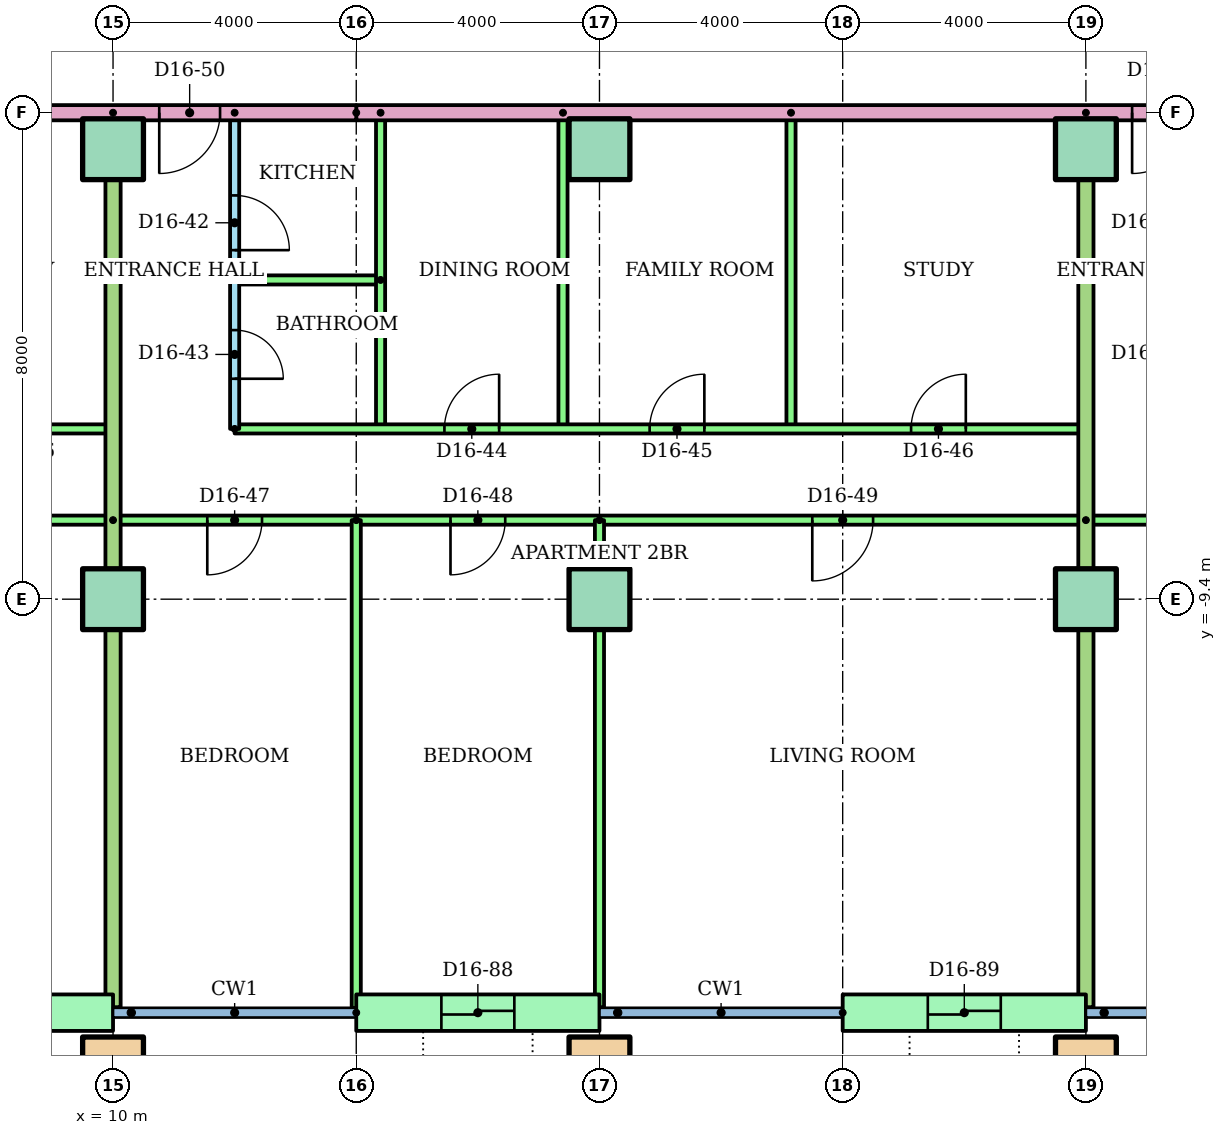
"""IFC4 building model, lengths in metres.
Left out: names, types, materials, properties, quantities, classifications, styles, units other than length and angle.
Written with IfcOpenShell. Run it as: python <this file> out.ifc"""

import sys

from ifc_helpers import new_model, si_unit, direction, frame, frame_2d, origin, origin_2d, place, context, subcontext, project, spatial, rectangle, hollow_rectangle, extrude, element, fill, save


model = new_model("IFC4")
c1 = context("Model", 3, precision=1e-05, world=origin(), true_north=direction((0.0, 1.0)))
c2 = subcontext(c1, "Body", "Model", "MODEL_VIEW")
j1 = project(units=[si_unit("LENGTHUNIT", "METRE"), si_unit("PLANEANGLEUNIT", "RADIAN")], contexts=[c1])
p1 = place(None, origin())
s1 = spatial("IfcSite", under=j1, at=p1, CompositionType="ELEMENT")
p2 = place(p1, origin())
s2 = spatial("IfcBuilding", under=s1, at=p2, CompositionType="ELEMENT")
p3 = place(p2, frame((0.0, 0.0, 60.8)))
s3 = spatial("IfcBuildingStorey", under=s2, at=p3, CompositionType="ELEMENT", Elevation=60.8)
for number, where in (
    (1, (10.0, -17.1, 0.0)),
    (2, (18.0, -17.1, 0.0)),
    (3, (26.0, -17.1, 0.0)),
):
    element("IfcColumn", number, at=place(p3, frame(where)), inside=s3, PredefinedType="COLUMN", context=c2, shape_type="SweptSolid", body=[
        extrude(hollow_rectangle(XDim=1.0, YDim=1.0, WallThickness=0.05, at=origin_2d()), origin(), (0.0, 0.0, 1.0), 3.2),
    ])
for number, where in (
    (4, (10.0, -9.4, 0.0)),
    (5, (18.0, -9.4, 0.0)),
    (6, (26.0, -9.4, 0.0)),
    (7, (10.0, -2.0, 0.0)),
    (8, (18.0, -2.0, 0.0)),
    (9, (26.0, -2.0, 0.0)),
):
    element("IfcColumn", number, at=place(p3, frame(where)), inside=s3, PredefinedType="COLUMN", context=c2, shape_type="SweptSolid", body=[
        extrude(rectangle(XDim=1.0, YDim=1.0, at=origin_2d()), origin(), (0.0, 0.0, 1.0), 3.2),
    ])
p4 = place(p3, frame((6.0, -16.2, 0.0)))
e10 = element("IfcWall", 10, at=p4, inside=s3, PredefinedType="STANDARD", context=c2, shape_type="SweptSolid", body=[
    extrude(rectangle(XDim=4.0, YDim=0.6, at=frame_2d((2.0, 0.0))), origin(), (0.0, 0.0, 1.0), 2.8),
])
p5 = place(p4, frame((1.4, 0.0, 0.0)))
e11 = element("IfcOpeningElement", 11, at=p5, cuts=e10, PredefinedType="OPENING", context=c2, shape_type="SweptSolid", body=[
    extrude(rectangle(XDim=1.2, YDim=2.1, at=frame_2d((0.6, 1.05))), frame((0.0, 0.31, 0.0), z_axis=(0.0, -1.0, 0.0), x_axis=(1.0, 0.0, 0.0)), (0.0, 0.0, 1.0), 0.62),
])
p6 = place(p3, frame((14.0, -16.2, 0.0)))
e12 = element("IfcWall", 12, at=p6, inside=s3, PredefinedType="STANDARD", context=c2, shape_type="SweptSolid", body=[
    extrude(rectangle(XDim=4.0, YDim=0.6, at=frame_2d((2.0, 0.0))), origin(), (0.0, 0.0, 1.0), 2.8),
])
p7 = place(p6, frame((1.4, 0.0, 0.0)))
e13 = element("IfcOpeningElement", 13, at=p7, cuts=e12, PredefinedType="OPENING", context=c2, shape_type="SweptSolid", body=[
    extrude(rectangle(XDim=1.2, YDim=2.1, at=frame_2d((0.6, 1.05))), frame((0.0, 0.31, 0.0), z_axis=(0.0, -1.0, 0.0), x_axis=(1.0, 0.0, 0.0)), (0.0, 0.0, 1.0), 0.62),
])
p8 = place(p3, frame((22.0, -16.2, 0.0)))
e14 = element("IfcWall", 14, at=p8, inside=s3, PredefinedType="STANDARD", context=c2, shape_type="SweptSolid", body=[
    extrude(rectangle(XDim=4.0, YDim=0.6, at=frame_2d((2.0, 0.0))), origin(), (0.0, 0.0, 1.0), 2.8),
])
p9 = place(p8, frame((1.4, 0.0, 0.0)))
e15 = element("IfcOpeningElement", 15, at=p9, cuts=e14, PredefinedType="OPENING", context=c2, shape_type="SweptSolid", body=[
    extrude(rectangle(XDim=1.2, YDim=2.1, at=frame_2d((0.6, 1.05))), frame((0.0, 0.31, 0.0), z_axis=(0.0, -1.0, 0.0), x_axis=(1.0, 0.0, 0.0)), (0.0, 0.0, 1.0), 0.62),
])
p10 = place(p3, frame((-4.0, -6.6, 0.0)))
e16 = element("IfcWall", 16, at=p10, inside=s3, PredefinedType="PARTITIONING", context=c2, shape_type="SweptSolid", body=[
    extrude(rectangle(XDim=14.0, YDim=0.15, at=frame_2d((7.0, 0.0))), origin(), (0.0, 0.0, 1.0), 2.4),
])
p11 = place(p10, frame((4.325, 0.0, 0.0)))
e17 = element("IfcOpeningElement", 17, at=p11, cuts=e16, PredefinedType="OPENING", context=c2, shape_type="SweptSolid", body=[
    extrude(rectangle(XDim=0.9, YDim=2.1, at=frame_2d((0.45, 1.05))), frame((0.0, 0.085, 0.0), z_axis=(0.0, -1.0, 0.0), x_axis=(1.0, 0.0, 0.0)), (0.0, 0.0, 1.0), 0.17),
])
p12 = place(p10, frame((8.575, 0.0, 0.0)))
e18 = element("IfcOpeningElement", 18, at=p12, cuts=e16, PredefinedType="OPENING", context=c2, shape_type="SweptSolid", body=[
    extrude(rectangle(XDim=0.9, YDim=2.1, at=frame_2d((0.45, 1.05))), frame((0.0, 0.085, 0.0), z_axis=(0.0, -1.0, 0.0), x_axis=(1.0, 0.0, 0.0)), (0.0, 0.0, 1.0), 0.17),
])
p13 = place(p10, frame((12.0, 0.0, 0.0)))
e19 = element("IfcOpeningElement", 19, at=p13, cuts=e16, PredefinedType="OPENING", context=c2, shape_type="SweptSolid", body=[
    extrude(rectangle(XDim=0.9, YDim=2.1, at=frame_2d((0.45, 1.05))), frame((0.0, 0.085, 0.0), z_axis=(0.0, -1.0, 0.0), x_axis=(1.0, 0.0, 0.0)), (0.0, 0.0, 1.0), 0.17),
])
p14 = place(p3, frame((10.0, -8.1, 0.0), z_axis=(0.0, 0.0, 1.0), x_axis=(-1.0, 0.0, 0.0)))
e20 = element("IfcWall", 20, at=p14, inside=s3, PredefinedType="PARTITIONING", context=c2, shape_type="SweptSolid", body=[
    extrude(rectangle(XDim=16.0, YDim=0.15, at=frame_2d((8.0, 0.0))), origin(), (0.0, 0.0, 1.0), 2.4),
])
p15 = place(p14, frame((13.55, 0.0, 0.0)))
e21 = element("IfcOpeningElement", 21, at=p15, cuts=e20, PredefinedType="OPENING", context=c2, shape_type="SweptSolid", body=[
    extrude(rectangle(XDim=0.9, YDim=2.1, at=frame_2d((0.45, 1.05))), frame((0.0, 0.085, 0.0), z_axis=(0.0, -1.0, 0.0), x_axis=(1.0, 0.0, 0.0)), (0.0, 0.0, 1.0), 0.17),
])
p16 = place(p14, frame((9.5, 0.0, 0.0)))
e22 = element("IfcOpeningElement", 22, at=p16, cuts=e20, PredefinedType="OPENING", context=c2, shape_type="SweptSolid", body=[
    extrude(rectangle(XDim=1.0, YDim=2.1, at=frame_2d((0.5, 1.05))), frame((0.0, 0.085, 0.0), z_axis=(0.0, -1.0, 0.0), x_axis=(1.0, 0.0, 0.0)), (0.0, 0.0, 1.0), 0.17),
])
p17 = place(p14, frame((5.55, 0.0, 0.0)))
e23 = element("IfcOpeningElement", 23, at=p17, cuts=e20, PredefinedType="OPENING", context=c2, shape_type="SweptSolid", body=[
    extrude(rectangle(XDim=0.9, YDim=2.1, at=frame_2d((0.45, 1.05))), frame((0.0, 0.085, 0.0), z_axis=(0.0, -1.0, 0.0), x_axis=(1.0, 0.0, 0.0)), (0.0, 0.0, 1.0), 0.17),
])
p18 = place(p14, frame((1.55, 0.0, 0.0)))
e24 = element("IfcOpeningElement", 24, at=p18, cuts=e20, PredefinedType="OPENING", context=c2, shape_type="SweptSolid", body=[
    extrude(rectangle(XDim=0.9, YDim=2.1, at=frame_2d((0.45, 1.05))), frame((0.0, 0.085, 0.0), z_axis=(0.0, -1.0, 0.0), x_axis=(1.0, 0.0, 0.0)), (0.0, 0.0, 1.0), 0.17),
])
p19 = place(p3, frame((12.0, -1.4, 0.0), z_axis=(0.0, 0.0, 1.0), x_axis=(0.0, -1.0, 0.0)))
e25 = element("IfcWall", 25, at=p19, inside=s3, PredefinedType="PARTITIONING", context=c2, shape_type="SweptSolid", body=[
    extrude(rectangle(XDim=5.2, YDim=0.15, at=frame_2d((2.6, 0.0))), origin(), (0.0, 0.0, 1.0), 2.4),
])
p20 = place(p19, frame((1.36, 0.0, 0.0)))
e26 = element("IfcOpeningElement", 26, at=p20, cuts=e25, PredefinedType="OPENING", context=c2, shape_type="SweptSolid", body=[
    extrude(rectangle(XDim=0.9, YDim=2.1, at=frame_2d((0.45, 1.05))), frame((0.0, 0.085, 0.0), z_axis=(0.0, -1.0, 0.0), x_axis=(1.0, 0.0, 0.0)), (0.0, 0.0, 1.0), 0.17),
])
p21 = place(p19, frame((3.575, 0.0, 0.0)))
e27 = element("IfcOpeningElement", 27, at=p21, cuts=e25, PredefinedType="OPENING", context=c2, shape_type="SweptSolid", body=[
    extrude(rectangle(XDim=0.8, YDim=2.1, at=frame_2d((0.4, 1.05))), frame((0.0, 0.085, 0.0), z_axis=(0.0, -1.0, 0.0), x_axis=(1.0, 0.0, 0.0)), (0.0, 0.0, 1.0), 0.17),
])
p22 = place(p3, frame((14.4, -4.15, 0.0), z_axis=(0.0, 0.0, 1.0), x_axis=(-1.0, 0.0, 0.0)))
e28 = element("IfcWall", 28, at=p22, inside=s3, PredefinedType="PARTITIONING", context=c2, shape_type="SweptSolid", body=[
    extrude(rectangle(XDim=2.4, YDim=0.15, at=frame_2d((1.2, 0.0))), origin(), (0.0, 0.0, 1.0), 2.4),
])
for number, where, z_axis, x_axis in (
    (29, (14.4, -1.4, 0.0), (0.0, 0.0, 1.0), (0.0, -1.0, 0.0)),
    (30, (17.4, -1.4, 0.0), (0.0, 0.0, 1.0), (0.0, -1.0, 0.0)),
    (31, (21.15, -1.4, 0.0), (0.0, 0.0, 1.0), (0.0, -1.0, 0.0)),
):
    element("IfcWall", number, at=place(p3, frame(where, z_axis=z_axis, x_axis=x_axis)), inside=s3, PredefinedType="PARTITIONING", context=c2, shape_type="SweptSolid", body=[
        extrude(rectangle(XDim=5.2, YDim=0.15, at=frame_2d((2.6, 0.0))), origin(), (0.0, 0.0, 1.0), 2.4),
    ])
p23 = place(p3, frame((12.0, -6.6, 0.0)))
e32 = element("IfcWall", 32, at=p23, inside=s3, PredefinedType="PARTITIONING", context=c2, shape_type="SweptSolid", body=[
    extrude(rectangle(XDim=14.0, YDim=0.15, at=frame_2d((7.0, 0.0))), origin(), (0.0, 0.0, 1.0), 2.4),
])
p24 = place(p23, frame((3.45, 0.0, 0.0)))
e33 = element("IfcOpeningElement", 33, at=p24, cuts=e32, PredefinedType="OPENING", context=c2, shape_type="SweptSolid", body=[
    extrude(rectangle(XDim=0.9, YDim=2.1, at=frame_2d((0.45, 1.05))), frame((0.0, 0.085, 0.0), z_axis=(0.0, -1.0, 0.0), x_axis=(1.0, 0.0, 0.0)), (0.0, 0.0, 1.0), 0.17),
])
p25 = place(p23, frame((6.825, 0.0, 0.0)))
e34 = element("IfcOpeningElement", 34, at=p25, cuts=e32, PredefinedType="OPENING", context=c2, shape_type="SweptSolid", body=[
    extrude(rectangle(XDim=0.9, YDim=2.1, at=frame_2d((0.45, 1.05))), frame((0.0, 0.085, 0.0), z_axis=(0.0, -1.0, 0.0), x_axis=(1.0, 0.0, 0.0)), (0.0, 0.0, 1.0), 0.17),
])
p26 = place(p23, frame((11.125, 0.0, 0.0)))
e35 = element("IfcOpeningElement", 35, at=p26, cuts=e32, PredefinedType="OPENING", context=c2, shape_type="SweptSolid", body=[
    extrude(rectangle(XDim=0.9, YDim=2.1, at=frame_2d((0.45, 1.05))), frame((0.0, 0.085, 0.0), z_axis=(0.0, -1.0, 0.0), x_axis=(1.0, 0.0, 0.0)), (0.0, 0.0, 1.0), 0.17),
])
p27 = place(p3, frame((26.0, -8.1, 0.0), z_axis=(0.0, 0.0, 1.0), x_axis=(-1.0, 0.0, 0.0)))
e36 = element("IfcWall", 36, at=p27, inside=s3, PredefinedType="PARTITIONING", context=c2, shape_type="SweptSolid", body=[
    extrude(rectangle(XDim=16.0, YDim=0.15, at=frame_2d((8.0, 0.0))), origin(), (0.0, 0.0, 1.0), 2.4),
])
p28 = place(p27, frame((13.55, 0.0, 0.0)))
e37 = element("IfcOpeningElement", 37, at=p28, cuts=e36, PredefinedType="OPENING", context=c2, shape_type="SweptSolid", body=[
    extrude(rectangle(XDim=0.9, YDim=2.1, at=frame_2d((0.45, 1.05))), frame((0.0, 0.085, 0.0), z_axis=(0.0, -1.0, 0.0), x_axis=(1.0, 0.0, 0.0)), (0.0, 0.0, 1.0), 0.17),
])
p29 = place(p27, frame((9.55, 0.0, 0.0)))
e38 = element("IfcOpeningElement", 38, at=p29, cuts=e36, PredefinedType="OPENING", context=c2, shape_type="SweptSolid", body=[
    extrude(rectangle(XDim=0.9, YDim=2.1, at=frame_2d((0.45, 1.05))), frame((0.0, 0.085, 0.0), z_axis=(0.0, -1.0, 0.0), x_axis=(1.0, 0.0, 0.0)), (0.0, 0.0, 1.0), 0.17),
])
p30 = place(p27, frame((3.5, 0.0, 0.0)))
e39 = element("IfcOpeningElement", 39, at=p30, cuts=e36, PredefinedType="OPENING", context=c2, shape_type="SweptSolid", body=[
    extrude(rectangle(XDim=1.0, YDim=2.1, at=frame_2d((0.5, 1.05))), frame((0.0, 0.085, 0.0), z_axis=(0.0, -1.0, 0.0), x_axis=(1.0, 0.0, 0.0)), (0.0, 0.0, 1.0), 0.17),
])
p31 = place(p3, frame((14.0, -8.1, 0.0), z_axis=(0.0, 0.0, 1.0), x_axis=(0.0, -1.0, 0.0)))
e40 = element("IfcWall", 40, at=p31, inside=s3, PredefinedType="PARTITIONING", context=c2, shape_type="SweptSolid", body=[
    extrude(rectangle(XDim=8.021, YDim=0.15, at=frame_2d((4.01, 0.0))), origin(), (0.0, 0.0, 1.0), 2.4),
])
p32 = place(p3, frame((18.0, -8.1, 0.0), z_axis=(0.0, 0.0, 1.0), x_axis=(0.0, -1.0, 0.0)))
e41 = element("IfcWall", 41, at=p32, inside=s3, PredefinedType="PARTITIONING", context=c2, shape_type="SweptSolid", body=[
    extrude(rectangle(XDim=8.01, YDim=0.15, at=frame_2d((4.005, 0.0))), origin(), (0.0, 0.0, 1.0), 2.4),
])
p33 = place(p3, frame((10.0, -1.4, 0.0), z_axis=(0.0, 0.0, 1.0), x_axis=(0.0, -1.0, 0.0)))
e42 = element("IfcWall", 42, at=p33, inside=s3, PredefinedType="PARTITIONING", context=c2, shape_type="SweptSolid", body=[
    extrude(rectangle(XDim=14.71, YDim=0.25, at=frame_2d((7.355, 0.0))), origin(), (0.0, 0.0, 1.0), 2.4),
])
p34 = place(p3, frame((36.52, -8.1, 0.0), z_axis=(0.0, 0.0, 1.0), x_axis=(-1.0, 0.0, 0.0)))
e43 = element("IfcWall", 43, at=p34, inside=s3, PredefinedType="PARTITIONING", context=c2, shape_type="SweptSolid", body=[
    extrude(rectangle(XDim=10.52, YDim=0.15, at=frame_2d((5.26, 0.0))), origin(), (0.0, 0.0, 1.0), 2.4),
])
p35 = place(p34, frame((7.12, 0.0, 0.0)))
e44 = element("IfcOpeningElement", 44, at=p35, cuts=e43, PredefinedType="OPENING", context=c2, shape_type="SweptSolid", body=[
    extrude(rectangle(XDim=1.0, YDim=2.1, at=frame_2d((0.5, 1.05))), frame((0.0, 0.085, 0.0), z_axis=(0.0, -1.0, 0.0), x_axis=(1.0, 0.0, 0.0)), (0.0, 0.0, 1.0), 0.17),
])
p36 = place(p34, frame((0.76, 0.0, 0.0)))
e45 = element("IfcOpeningElement", 45, at=p36, cuts=e43, PredefinedType="OPENING", context=c2, shape_type="SweptSolid", body=[
    extrude(rectangle(XDim=1.0, YDim=2.1, at=frame_2d((0.5, 1.05))), frame((0.0, 0.085, 0.0), z_axis=(0.0, -1.0, 0.0), x_axis=(1.0, 0.0, 0.0)), (0.0, 0.0, 1.0), 0.17),
])
p37 = place(p3, frame((26.0, -1.4, 0.0), z_axis=(0.0, 0.0, 1.0), x_axis=(0.0, -1.0, 0.0)))
e46 = element("IfcWall", 46, at=p37, inside=s3, PredefinedType="PARTITIONING", context=c2, shape_type="SweptSolid", body=[
    extrude(rectangle(XDim=14.71, YDim=0.25, at=frame_2d((7.355, 0.0))), origin(), (0.0, 0.0, 1.0), 2.4),
])
p38 = place(p3, frame((29.0, -1.4, 0.0), z_axis=(0.0, 0.0, 1.0), x_axis=(-1.0, 0.0, 0.0)))
e47 = element("IfcWall", 47, at=p38, inside=s3, PredefinedType="PARTITIONING", context=c2, shape_type="SweptSolid", body=[
    extrude(rectangle(XDim=15.0, YDim=0.25, at=frame_2d((7.5, 0.0))), origin(), (0.0, 0.0, 1.0), 2.4),
])
p39 = place(p38, frame((1.24, 0.0, 0.0)))
e48 = element("IfcOpeningElement", 48, at=p39, cuts=e47, PredefinedType="OPENING", context=c2, shape_type="SweptSolid", body=[
    extrude(rectangle(XDim=1.0, YDim=2.1, at=frame_2d((0.5, 1.05))), frame((0.0, 0.135, 0.0), z_axis=(0.0, -1.0, 0.0), x_axis=(1.0, 0.0, 0.0)), (0.0, 0.0, 1.0), 0.27),
])
p40 = place(p3, frame((14.0, -1.4, 0.0), z_axis=(0.0, 0.0, 1.0), x_axis=(-1.0, 0.0, 0.0)))
e49 = element("IfcWall", 49, at=p40, inside=s3, PredefinedType="PARTITIONING", context=c2, shape_type="SweptSolid", body=[
    extrude(rectangle(XDim=28.0, YDim=0.25, at=frame_2d((14.0, 0.0))), origin(), (0.0, 0.0, 1.0), 2.4),
])
p41 = place(p40, frame((20.76, 0.0, 0.0)))
e50 = element("IfcOpeningElement", 50, at=p41, cuts=e49, PredefinedType="OPENING", context=c2, shape_type="SweptSolid", body=[
    extrude(rectangle(XDim=1.0, YDim=2.1, at=frame_2d((0.5, 1.05))), frame((0.0, 0.135, 0.0), z_axis=(0.0, -1.0, 0.0), x_axis=(1.0, 0.0, 0.0)), (0.0, 0.0, 1.0), 0.27),
])
p42 = place(p40, frame((18.24, 0.0, 0.0)))
e51 = element("IfcOpeningElement", 51, at=p42, cuts=e49, PredefinedType="OPENING", context=c2, shape_type="SweptSolid", body=[
    extrude(rectangle(XDim=1.0, YDim=2.1, at=frame_2d((0.5, 1.05))), frame((0.0, 0.135, 0.0), z_axis=(0.0, -1.0, 0.0), x_axis=(1.0, 0.0, 0.0)), (0.0, 0.0, 1.0), 0.27),
])
p43 = place(p40, frame((2.24, 0.0, 0.0)))
e52 = element("IfcOpeningElement", 52, at=p43, cuts=e49, PredefinedType="OPENING", context=c2, shape_type="SweptSolid", body=[
    extrude(rectangle(XDim=1.0, YDim=2.1, at=frame_2d((0.5, 1.05))), frame((0.0, 0.135, 0.0), z_axis=(0.0, -1.0, 0.0), x_axis=(1.0, 0.0, 0.0)), (0.0, 0.0, 1.0), 0.27),
])
p44 = place(p20, origin())
e53 = element("IfcDoor", 53, at=p44, inside=s3, OperationType="SINGLE_SWING_RIGHT", PredefinedType="DOOR", context=c2, shape_type="SweptSolid", body=[
    extrude(rectangle(XDim=0.9, YDim=2.1, at=frame_2d((0.45, 1.05))), frame((0.0, 0.025, 0.0), z_axis=(0.0, -1.0, 0.0), x_axis=(1.0, 0.0, 0.0)), (0.0, 0.0, 1.0), 0.05),
])
fill(e26, e53)
p45 = place(p21, origin())
e54 = element("IfcDoor", 54, at=p45, inside=s3, OperationType="SINGLE_SWING_RIGHT", PredefinedType="DOOR", context=c2, shape_type="SweptSolid", body=[
    extrude(rectangle(XDim=0.8, YDim=2.1, at=frame_2d((0.4, 1.05))), frame((0.0, 0.025, 0.0), z_axis=(0.0, -1.0, 0.0), x_axis=(1.0, 0.0, 0.0)), (0.0, 0.0, 1.0), 0.05),
])
fill(e27, e54)
p46 = place(p24, origin())
e55 = element("IfcDoor", 55, at=p46, inside=s3, OperationType="SINGLE_SWING_RIGHT", PredefinedType="DOOR", context=c2, shape_type="SweptSolid", body=[
    extrude(rectangle(XDim=0.9, YDim=2.1, at=frame_2d((0.45, 1.05))), frame((0.0, 0.025, 0.0), z_axis=(0.0, -1.0, 0.0), x_axis=(1.0, 0.0, 0.0)), (0.0, 0.0, 1.0), 0.05),
])
fill(e33, e55)
p47 = place(p25, origin())
e56 = element("IfcDoor", 56, at=p47, inside=s3, OperationType="SINGLE_SWING_RIGHT", PredefinedType="DOOR", context=c2, shape_type="SweptSolid", body=[
    extrude(rectangle(XDim=0.9, YDim=2.1, at=frame_2d((0.45, 1.05))), frame((0.0, 0.025, 0.0), z_axis=(0.0, -1.0, 0.0), x_axis=(1.0, 0.0, 0.0)), (0.0, 0.0, 1.0), 0.05),
])
fill(e34, e56)
p48 = place(p26, origin())
e57 = element("IfcDoor", 57, at=p48, inside=s3, OperationType="SINGLE_SWING_RIGHT", PredefinedType="DOOR", context=c2, shape_type="SweptSolid", body=[
    extrude(rectangle(XDim=0.9, YDim=2.1, at=frame_2d((0.45, 1.05))), frame((0.0, 0.025, 0.0), z_axis=(0.0, -1.0, 0.0), x_axis=(1.0, 0.0, 0.0)), (0.0, 0.0, 1.0), 0.05),
])
fill(e35, e57)
p49 = place(p28, origin())
e58 = element("IfcDoor", 58, at=p49, inside=s3, OperationType="SINGLE_SWING_RIGHT", PredefinedType="DOOR", context=c2, shape_type="SweptSolid", body=[
    extrude(rectangle(XDim=0.9, YDim=2.1, at=frame_2d((0.45, 1.05))), frame((0.0, 0.025, 0.0), z_axis=(0.0, -1.0, 0.0), x_axis=(1.0, 0.0, 0.0)), (0.0, 0.0, 1.0), 0.05),
])
fill(e37, e58)
p50 = place(p29, origin())
e59 = element("IfcDoor", 59, at=p50, inside=s3, OperationType="SINGLE_SWING_RIGHT", PredefinedType="DOOR", context=c2, shape_type="SweptSolid", body=[
    extrude(rectangle(XDim=0.9, YDim=2.1, at=frame_2d((0.45, 1.05))), frame((0.0, 0.025, 0.0), z_axis=(0.0, -1.0, 0.0), x_axis=(1.0, 0.0, 0.0)), (0.0, 0.0, 1.0), 0.05),
])
fill(e38, e59)
p51 = place(p30, origin())
e60 = element("IfcDoor", 60, at=p51, inside=s3, OperationType="SINGLE_SWING_RIGHT", PredefinedType="DOOR", context=c2, shape_type="SweptSolid", body=[
    extrude(rectangle(XDim=1.0, YDim=2.1, at=frame_2d((0.5, 1.05))), frame((0.0, 0.025, 0.0), z_axis=(0.0, -1.0, 0.0), x_axis=(1.0, 0.0, 0.0)), (0.0, 0.0, 1.0), 0.05),
])
fill(e39, e60)
p52 = place(p43, origin())
e61 = element("IfcDoor", 61, at=p52, inside=s3, OperationType="SINGLE_SWING_RIGHT", PredefinedType="DOOR", context=c2, shape_type="SweptSolid", body=[
    extrude(rectangle(XDim=1.0, YDim=2.1, at=frame_2d((0.5, 1.05))), frame((0.0, 0.025, 0.0), z_axis=(0.0, -1.0, 0.0), x_axis=(1.0, 0.0, 0.0)), (0.0, 0.0, 1.0), 0.05),
])
fill(e52, e61)
p53 = place(p39, origin())
e62 = element("IfcDoor", 62, at=p53, inside=s3, OperationType="SINGLE_SWING_RIGHT", PredefinedType="DOOR", context=c2, shape_type="SweptSolid", body=[
    extrude(rectangle(XDim=1.0, YDim=2.1, at=frame_2d((0.5, 1.05))), frame((0.0, 0.025, 0.0), z_axis=(0.0, -1.0, 0.0), x_axis=(1.0, 0.0, 0.0)), (0.0, 0.0, 1.0), 0.05),
])
fill(e48, e62)
p54 = place(p7, origin())
e63 = element("IfcDoor", 63, at=p54, inside=s3, OperationType="SLIDING_TO_LEFT", PredefinedType="DOOR", context=c2, shape_type="SweptSolid", body=[
    extrude(rectangle(XDim=1.2, YDim=2.1, at=frame_2d((0.6, 1.05))), frame((0.0, 0.025, 0.0), z_axis=(0.0, -1.0, 0.0), x_axis=(1.0, 0.0, 0.0)), (0.0, 0.0, 1.0), 0.05),
])
fill(e13, e63)
p55 = place(p9, origin())
e64 = element("IfcDoor", 64, at=p55, inside=s3, OperationType="SLIDING_TO_LEFT", PredefinedType="DOOR", context=c2, shape_type="SweptSolid", body=[
    extrude(rectangle(XDim=1.2, YDim=2.1, at=frame_2d((0.6, 1.05))), frame((0.0, 0.025, 0.0), z_axis=(0.0, -1.0, 0.0), x_axis=(1.0, 0.0, 0.0)), (0.0, 0.0, 1.0), 0.05),
])
fill(e15, e64)
save(model, sys.argv[1])
